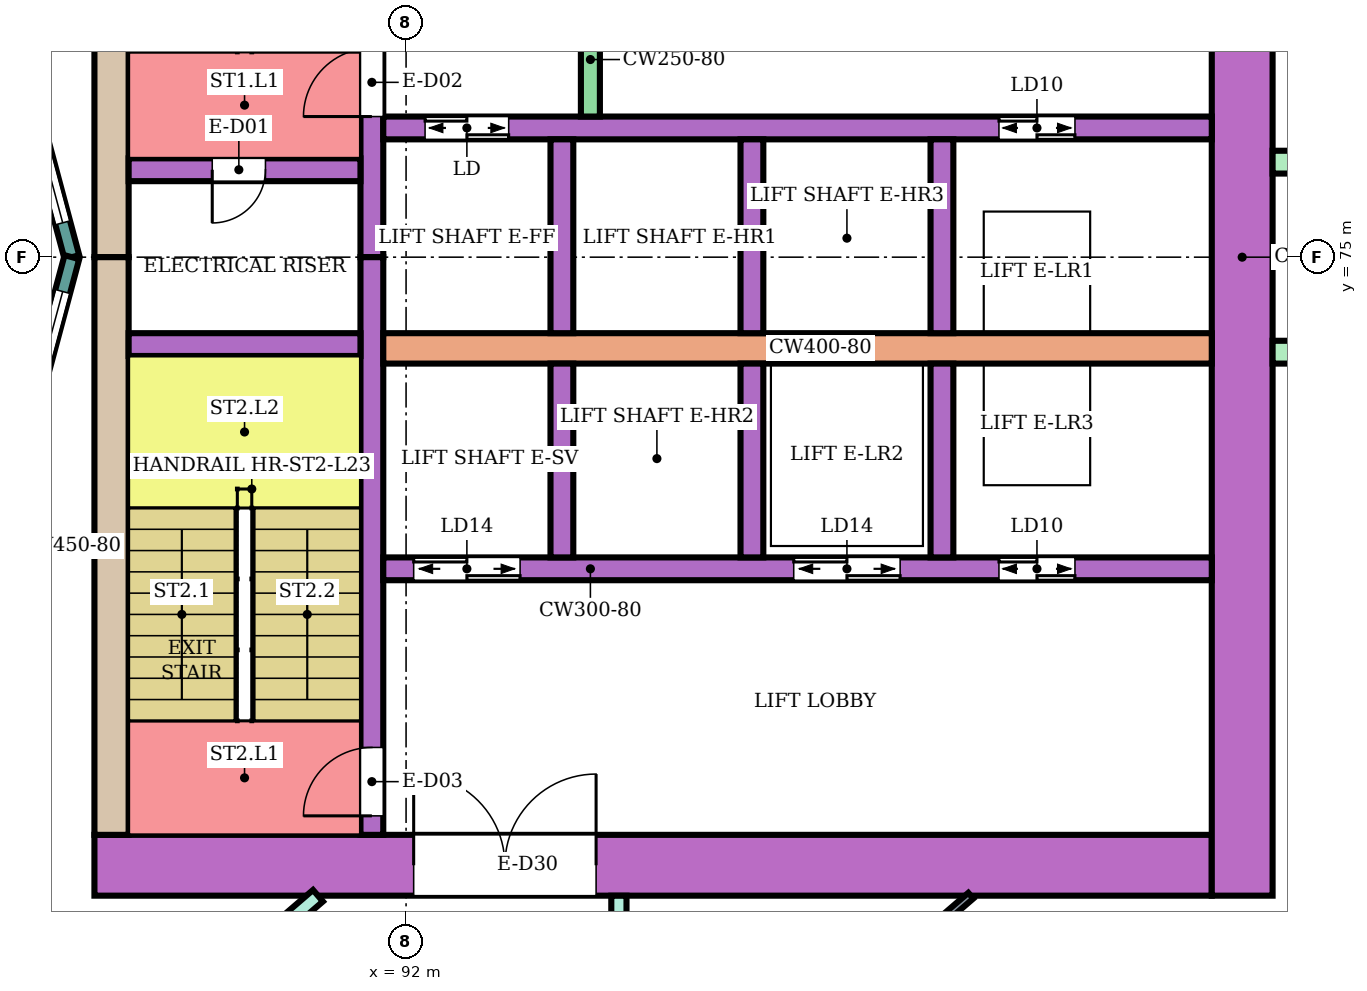
"""IFC4 building model, lengths in metres.
Left out: names, types, materials, properties, quantities, classifications, styles, units other than length and angle.
Written with IfcOpenShell. Run it as: python <this file> out.ifc"""

import sys

from ifc_helpers import new_model, si_unit, direction, frame, frame_2d, origin, place, context, subcontext, project, spatial, rectangle, extrude, element, fill, save


model = new_model("IFC4")
c1 = context("Model", 3, precision=1e-05, world=origin(), true_north=direction((0.0, 1.0)))
c2 = subcontext(c1, "Body", "Model", "MODEL_VIEW")
j1 = project(units=[si_unit("LENGTHUNIT", "METRE"), si_unit("PLANEANGLEUNIT", "RADIAN")], contexts=[c1])
p1 = place(None, origin())
s1 = spatial("IfcSite", under=j1, at=p1, CompositionType="ELEMENT")
p2 = place(p1, origin())
s2 = spatial("IfcBuilding", under=s1, at=p2, CompositionType="ELEMENT")
p3 = place(p2, frame((0.0, 0.0, 101.4)))
s3 = spatial("IfcBuildingStorey", under=s2, at=p3, CompositionType="ELEMENT", Elevation=101.4)
p4 = place(p3, frame((87.9, 67.0, 0.0), z_axis=(0.0, 0.0, 1.0), x_axis=(1.0, 0.0, 0.0)))
e1 = element("IfcWall", 1, at=p4, inside=s3, PredefinedType="SHEAR", context=c2, shape_type="SweptSolid", body=[
    extrude(rectangle(XDim=14.7, YDim=0.8, at=frame_2d((7.35, 0.0))), origin(), (0.0, 0.0, 1.0), 3.48),
])
p5 = place(p4, frame((4.2, 0.0, 0.0)))
e2 = element("IfcOpeningElement", 2, at=p5, cuts=e1, PredefinedType="OPENING", context=c2, shape_type="SweptSolid", body=[
    extrude(rectangle(XDim=2.4, YDim=2.4, at=frame_2d((1.2, 1.2))), frame((0.0, 0.41, 0.0), z_axis=(0.0, -1.0, 0.0), x_axis=(1.0, 0.0, 0.0)), (0.0, 0.0, 1.0), 0.82),
])
for number, where, z_axis, x_axis in (
    (3, (88.125, 75.0, 0.0), (0.0, 0.0, 1.0), (0.0, 1.0, 0.0)),
    (4, (88.125, 67.4, 0.0), (0.0, 0.0, 1.0), (0.0, 1.0, 0.0)),
):
    element("IfcWall", number, at=place(p3, frame(where, z_axis=z_axis, x_axis=x_axis)), inside=s3, PredefinedType="SHEAR", context=c2, shape_type="SweptSolid", body=[
        extrude(rectangle(XDim=7.6, YDim=0.45, at=frame_2d((3.8, 0.0))), origin(), (0.0, 0.0, 1.0), 3.48),
    ])
p6 = place(p3, frame((103.0, 66.6, 0.0), z_axis=(0.0, 0.0, 1.0), x_axis=(0.0, 1.0, 0.0)))
e5 = element("IfcWall", 5, at=p6, inside=s3, PredefinedType="SHEAR", context=c2, shape_type="SweptSolid", body=[
    extrude(rectangle(XDim=16.8, YDim=0.8, at=frame_2d((8.4, 0.0))), origin(), (0.0, 0.0, 1.0), 3.48),
])
p7 = place(p3, frame((91.55, 75.0, 0.0), z_axis=(0.0, 0.0, 1.0), x_axis=(0.0, 1.0, 0.0)))
e6 = element("IfcWall", 6, at=p7, inside=s3, PredefinedType="SHEAR", context=c2, shape_type="SweptSolid", body=[
    extrude(rectangle(XDim=7.6, YDim=0.3, at=frame_2d((3.8, 0.0))), origin(), (0.0, 0.0, 1.0), 3.48),
])
p8 = place(p7, frame((1.85, 0.0, 0.0)))
e7 = element("IfcOpeningElement", 7, at=p8, cuts=e6, PredefinedType="OPENING", context=c2, shape_type="SweptSolid", body=[
    extrude(rectangle(XDim=0.9, YDim=2.1, at=frame_2d((0.45, 1.05))), frame((0.0, 0.16, 0.0), z_axis=(0.0, -1.0, 0.0), x_axis=(1.0, 0.0, 0.0)), (0.0, 0.0, 1.0), 0.32),
])
p9 = place(p3, frame((91.55, 67.4, 0.0), z_axis=(0.0, 0.0, 1.0), x_axis=(0.0, 1.0, 0.0)))
e8 = element("IfcWall", 8, at=p9, inside=s3, PredefinedType="SHEAR", context=c2, shape_type="SweptSolid", body=[
    extrude(rectangle(XDim=7.6, YDim=0.3, at=frame_2d((3.8, 0.0))), origin(), (0.0, 0.0, 1.0), 3.48),
])
p10 = place(p9, frame((0.25, 0.0, 0.0)))
e9 = element("IfcOpeningElement", 9, at=p10, cuts=e8, PredefinedType="OPENING", context=c2, shape_type="SweptSolid", body=[
    extrude(rectangle(XDim=0.9, YDim=2.1, at=frame_2d((0.45, 1.05))), frame((0.0, 0.16, 0.0), z_axis=(0.0, -1.0, 0.0), x_axis=(1.0, 0.0, 0.0)), (0.0, 0.0, 1.0), 0.32),
])
p11 = place(p3, frame((88.35, 76.15, 0.0), z_axis=(0.0, 0.0, 1.0), x_axis=(1.0, 0.0, 0.0)))
e10 = element("IfcWall", 10, at=p11, inside=s3, PredefinedType="SHEAR", context=c2, shape_type="SweptSolid", body=[
    extrude(rectangle(XDim=3.05, YDim=0.3, at=frame_2d((1.525, 0.0))), origin(), (0.0, 0.0, 1.0), 3.48),
])
p12 = place(p11, frame((1.1, 0.0, 0.0)))
e11 = element("IfcOpeningElement", 11, at=p12, cuts=e10, PredefinedType="OPENING", context=c2, shape_type="SweptSolid", body=[
    extrude(rectangle(XDim=0.7, YDim=2.0, at=frame_2d((0.35, 1.0))), frame((0.0, 0.16, 0.0), z_axis=(0.0, -1.0, 0.0), x_axis=(1.0, 0.0, 0.0)), (0.0, 0.0, 1.0), 0.32),
])
p13 = place(p3, frame((88.35, 73.85, 0.0), z_axis=(0.0, 0.0, 1.0), x_axis=(1.0, 0.0, 0.0)))
e12 = element("IfcWall", 12, at=p13, inside=s3, PredefinedType="SHEAR", context=c2, shape_type="SweptSolid", body=[
    extrude(rectangle(XDim=3.05, YDim=0.3, at=frame_2d((1.525, 0.0))), origin(), (0.0, 0.0, 1.0), 3.48),
])
p14 = place(p3, frame((91.7, 76.7, 0.0), z_axis=(0.0, 0.0, 1.0), x_axis=(1.0, 0.0, 0.0)))
e13 = element("IfcWall", 13, at=p14, inside=s3, PredefinedType="SHEAR", context=c2, shape_type="SweptSolid", body=[
    extrude(rectangle(XDim=10.9, YDim=0.3, at=frame_2d((5.45, 0.0))), origin(), (0.0, 0.0, 1.0), 3.48),
])
p15 = place(p14, frame((0.55, 0.0, 0.0)))
e14 = element("IfcOpeningElement", 14, at=p15, cuts=e13, PredefinedType="OPENING", context=c2, shape_type="SweptSolid", body=[
    extrude(rectangle(XDim=1.1, YDim=2.1, at=frame_2d((0.55, 1.05))), frame((0.0, 0.16, 0.0), z_axis=(0.0, -1.0, 0.0), x_axis=(1.0, 0.0, 0.0)), (0.0, 0.0, 1.0), 0.32),
])
p16 = place(p14, frame((8.1, 0.0, 0.0)))
e15 = element("IfcOpeningElement", 15, at=p16, cuts=e13, PredefinedType="OPENING", context=c2, shape_type="SweptSolid", body=[
    extrude(rectangle(XDim=1.0, YDim=2.1, at=frame_2d((0.5, 1.05))), frame((0.0, 0.16, 0.0), z_axis=(0.0, -1.0, 0.0), x_axis=(1.0, 0.0, 0.0)), (0.0, 0.0, 1.0), 0.32),
])
p17 = place(p3, frame((91.7, 73.8, 0.0), z_axis=(0.0, 0.0, 1.0), x_axis=(1.0, 0.0, 0.0)))
e16 = element("IfcWall", 16, at=p17, inside=s3, PredefinedType="SHEAR", context=c2, shape_type="SweptSolid", body=[
    extrude(rectangle(XDim=10.9, YDim=0.4, at=frame_2d((5.45, 0.0))), origin(), (0.0, 0.0, 1.0), 3.48),
])
p18 = place(p3, frame((91.7, 70.9, 0.0), z_axis=(0.0, 0.0, 1.0), x_axis=(1.0, 0.0, 0.0)))
e17 = element("IfcWall", 17, at=p18, inside=s3, PredefinedType="SHEAR", context=c2, shape_type="SweptSolid", body=[
    extrude(rectangle(XDim=10.9, YDim=0.3, at=frame_2d((5.45, 0.0))), origin(), (0.0, 0.0, 1.0), 3.48),
])
p19 = place(p18, frame((0.4, 0.0, 0.0)))
e18 = element("IfcOpeningElement", 18, at=p19, cuts=e17, PredefinedType="OPENING", context=c2, shape_type="SweptSolid", body=[
    extrude(rectangle(XDim=1.4, YDim=2.1, at=frame_2d((0.7, 1.05))), frame((0.0, 0.16, 0.0), z_axis=(0.0, -1.0, 0.0), x_axis=(1.0, 0.0, 0.0)), (0.0, 0.0, 1.0), 0.32),
])
p20 = place(p18, frame((5.4, 0.0, 0.0)))
e19 = element("IfcOpeningElement", 19, at=p20, cuts=e17, PredefinedType="OPENING", context=c2, shape_type="SweptSolid", body=[
    extrude(rectangle(XDim=1.4, YDim=2.1, at=frame_2d((0.7, 1.05))), frame((0.0, 0.16, 0.0), z_axis=(0.0, -1.0, 0.0), x_axis=(1.0, 0.0, 0.0)), (0.0, 0.0, 1.0), 0.32),
])
p21 = place(p18, frame((8.1, 0.0, 0.0)))
e20 = element("IfcOpeningElement", 20, at=p21, cuts=e17, PredefinedType="OPENING", context=c2, shape_type="SweptSolid", body=[
    extrude(rectangle(XDim=1.0, YDim=2.1, at=frame_2d((0.5, 1.05))), frame((0.0, 0.16, 0.0), z_axis=(0.0, -1.0, 0.0), x_axis=(1.0, 0.0, 0.0)), (0.0, 0.0, 1.0), 0.32),
])
for number, where, z_axis, x_axis in (
    (21, (94.05, 74.0, 0.0), (0.0, 0.0, 1.0), (0.0, 1.0, 0.0)),
    (22, (96.55, 74.0, 0.0), (0.0, 0.0, 1.0), (0.0, 1.0, 0.0)),
    (23, (99.05, 74.0, 0.0), (0.0, 0.0, 1.0), (0.0, 1.0, 0.0)),
    (24, (94.05, 71.05, 0.0), (0.0, 0.0, 1.0), (0.0, 1.0, 0.0)),
    (25, (96.55, 71.05, 0.0), (0.0, 0.0, 1.0), (0.0, 1.0, 0.0)),
    (26, (99.05, 71.05, 0.0), (0.0, 0.0, 1.0), (0.0, 1.0, 0.0)),
):
    element("IfcWall", number, at=place(p3, frame(where, z_axis=z_axis, x_axis=x_axis)), inside=s3, PredefinedType="SHEAR", context=c2, shape_type="SweptSolid", body=[
        extrude(rectangle(XDim=2.55, YDim=0.3, at=frame_2d((1.275, 0.0))), origin(), (0.0, 0.0, 1.0), 3.48),
    ])
p22 = place(p3, frame((94.425, 76.85, 0.0), z_axis=(0.0, 0.0, 1.0), x_axis=(0.0, 1.0, 0.0)))
e27 = element("IfcWall", 27, at=p22, inside=s3, PredefinedType="SHEAR", context=c2, shape_type="SweptSolid", body=[
    extrude(rectangle(XDim=1.5, YDim=0.25, at=frame_2d((0.75, 0.0))), origin(), (0.0, 0.0, 1.0), 3.48),
])
for number, where, z_axis, x_axis in (
    (28, (103.4, 73.75, 0.0), (0.0, 0.0, 1.0), (1.0, 0.0, 0.0)),
    (29, (103.4, 76.25, 0.0), (0.0, 0.0, 1.0), (1.0, 0.0, 0.0)),
):
    element("IfcWall", number, at=place(p3, frame(where, z_axis=z_axis, x_axis=x_axis)), inside=s3, PredefinedType="NOTDEFINED", context=c2, shape_type="SweptSolid", body=[
        extrude(rectangle(XDim=2.416, YDim=0.3, at=frame_2d((1.208, 0.0))), origin(), (0.0, 0.0, 1.0), 3.8),
    ])
p23 = place(p3, frame((87.604, 75.0, 0.0), z_axis=(0.0, 0.0, 1.0), x_axis=(-0.258789828301, 0.965933654434, 0.0)))
e30 = element("IfcWall", 30, at=p23, inside=s3, PredefinedType="NOTDEFINED", context=c2, shape_type="SweptSolid", body=[
    extrude(rectangle(XDim=3.936, YDim=0.2, at=frame_2d((1.968, 0.0))), origin(), (0.0, 0.0, 1.0), 3.8),
])
p24 = place(p23, frame((0.468, 0.0, 0.9)))
e31 = element("IfcOpeningElement", 31, at=p24, cuts=e30, PredefinedType="OPENING", context=c2, shape_type="SweptSolid", body=[
    extrude(rectangle(XDim=3.0, YDim=2.3, at=frame_2d((1.5, 1.15))), frame((0.0, 0.11, 0.0), z_axis=(0.0, -1.0, 0.0), x_axis=(1.0, 0.0, 0.0)), (0.0, 0.0, 1.0), 0.22),
])
p25 = place(p3, frame((86.585, 71.198, 0.0), z_axis=(0.0, 0.0, 1.0), x_axis=(0.258789828301, 0.965933654434, 0.0)))
e32 = element("IfcWall", 32, at=p25, inside=s3, PredefinedType="NOTDEFINED", context=c2, shape_type="SweptSolid", body=[
    extrude(rectangle(XDim=3.936, YDim=0.2, at=frame_2d((1.968, 0.0))), origin(), (0.0, 0.0, 1.0), 3.8),
])
p26 = place(p25, frame((0.468, 0.0, 0.9)))
e33 = element("IfcOpeningElement", 33, at=p26, cuts=e32, PredefinedType="OPENING", context=c2, shape_type="SweptSolid", body=[
    extrude(rectangle(XDim=3.0, YDim=2.3, at=frame_2d((1.5, 1.15))), frame((0.0, 0.11, 0.0), z_axis=(0.0, -1.0, 0.0), x_axis=(1.0, 0.0, 0.0)), (0.0, 0.0, 1.0), 0.22),
])
p27 = place(p3, frame((86.877, 63.189, 0.0), z_axis=(0.0, 0.0, 1.0), x_axis=(0.758088707506, 0.652151448325, 0.0)))
e34 = element("IfcWall", 34, at=p27, inside=s3, PredefinedType="PARTITIONING", context=c2, shape_type="SweptSolid", body=[
    extrude(rectangle(XDim=5.229, YDim=0.2, at=frame_2d((2.615, 0.0))), origin(), (0.0, 0.0, 1.0), 3.35),
])
p28 = place(p3, frame((94.8, 65.1, 0.0), z_axis=(0.0, 0.0, 1.0), x_axis=(0.0, 1.0, 0.0)))
e35 = element("IfcWall", 35, at=p28, inside=s3, PredefinedType="PARTITIONING", context=c2, shape_type="SweptSolid", body=[
    extrude(rectangle(XDim=1.499, YDim=0.2, at=frame_2d((0.75, 0.0))), origin(), (0.0, 0.0, 1.0), 3.35),
])
p29 = place(p3, frame((93.577, 61.565, 0.0), z_axis=(0.0, 0.0, 1.0), x_axis=(0.75812140399, 0.652113438607, 0.0)))
e36 = element("IfcWall", 36, at=p29, inside=s3, PredefinedType="PARTITIONING", context=c2, shape_type="SweptSolid", body=[
    extrude(rectangle(XDim=7.72, YDim=0.1, at=frame_2d((3.86, 0.0))), origin(), (0.0, 0.0, 1.0), 3.35),
])
p30 = place(p29, frame((4.35, 0.0, 0.0)))
e37 = element("IfcOpeningElement", 37, at=p30, cuts=e36, PredefinedType="OPENING", context=c2, shape_type="SweptSolid", body=[
    extrude(rectangle(XDim=0.9, YDim=2.1, at=frame_2d((0.45, 1.05))), frame((0.0, 0.06, 0.0), z_axis=(0.0, -1.0, 0.0), x_axis=(1.0, 0.0, 0.0)), (0.0, 0.0, 1.0), 0.12),
])
p31 = place(p24, origin())
e38 = element("IfcWindow", 38, at=p31, inside=s3, PartitioningType="SINGLE_PANEL", PredefinedType="WINDOW", context=c2, shape_type="SweptSolid", body=[
    extrude(rectangle(XDim=3.0, YDim=2.3, at=frame_2d((1.5, 1.15))), frame((0.0, 0.03, 0.0), z_axis=(0.0, -1.0, 0.0), x_axis=(1.0, 0.0, 0.0)), (0.0, 0.0, 1.0), 0.06),
])
fill(e31, e38)
p32 = place(p26, origin())
e39 = element("IfcWindow", 39, at=p32, inside=s3, PartitioningType="SINGLE_PANEL", PredefinedType="WINDOW", context=c2, shape_type="SweptSolid", body=[
    extrude(rectangle(XDim=3.0, YDim=2.3, at=frame_2d((1.5, 1.15))), frame((0.0, 0.03, 0.0), z_axis=(0.0, -1.0, 0.0), x_axis=(1.0, 0.0, 0.0)), (0.0, 0.0, 1.0), 0.06),
])
fill(e33, e39)
p33 = place(p12, frame((0.7, 0.0, 0.0), z_axis=(0.0, 0.0, 1.0), x_axis=(-1.0, 0.0, 0.0)))
e40 = element("IfcDoor", 40, at=p33, inside=s3, OperationType="SINGLE_SWING_RIGHT", PredefinedType="DOOR", context=c2, shape_type="SweptSolid", body=[
    extrude(rectangle(XDim=0.7, YDim=2.0, at=frame_2d((0.35, 1.0))), frame((0.0, 0.025, 0.0), z_axis=(0.0, -1.0, 0.0), x_axis=(1.0, 0.0, 0.0)), (0.0, 0.0, 1.0), 0.05),
])
fill(e11, e40)
p34 = place(p8, origin())
e41 = element("IfcDoor", 41, at=p34, inside=s3, OperationType="SINGLE_SWING_LEFT", PredefinedType="DOOR", context=c2, shape_type="SweptSolid", body=[
    extrude(rectangle(XDim=0.9, YDim=2.1, at=frame_2d((0.45, 1.05))), frame((0.0, 0.025, 0.0), z_axis=(0.0, -1.0, 0.0), x_axis=(1.0, 0.0, 0.0)), (0.0, 0.0, 1.0), 0.05),
])
fill(e7, e41)
p35 = place(p10, origin())
e42 = element("IfcDoor", 42, at=p35, inside=s3, OperationType="SINGLE_SWING_LEFT", PredefinedType="DOOR", context=c2, shape_type="SweptSolid", body=[
    extrude(rectangle(XDim=0.9, YDim=2.1, at=frame_2d((0.45, 1.05))), frame((0.0, 0.025, 0.0), z_axis=(0.0, -1.0, 0.0), x_axis=(1.0, 0.0, 0.0)), (0.0, 0.0, 1.0), 0.05),
])
fill(e9, e42)
p36 = place(p15, origin())
e43 = element("IfcDoor", 43, at=p36, inside=s3, OperationType="DOUBLE_DOOR_SLIDING", PredefinedType="DOOR", context=c2, shape_type="SweptSolid", body=[
    extrude(rectangle(XDim=1.1, YDim=2.1, at=frame_2d((0.55, 1.05))), frame((0.0, 0.025, 0.0), z_axis=(0.0, -1.0, 0.0), x_axis=(1.0, 0.0, 0.0)), (0.0, 0.0, 1.0), 0.05),
])
fill(e14, e43)
p37 = place(p16, origin())
e44 = element("IfcDoor", 44, at=p37, inside=s3, OperationType="DOUBLE_DOOR_SLIDING", PredefinedType="DOOR", context=c2, shape_type="SweptSolid", body=[
    extrude(rectangle(XDim=1.0, YDim=2.1, at=frame_2d((0.5, 1.05))), frame((0.0, 0.025, 0.0), z_axis=(0.0, -1.0, 0.0), x_axis=(1.0, 0.0, 0.0)), (0.0, 0.0, 1.0), 0.05),
])
fill(e15, e44)
p38 = place(p19, origin())
e45 = element("IfcDoor", 45, at=p38, inside=s3, OperationType="DOUBLE_DOOR_SLIDING", PredefinedType="DOOR", context=c2, shape_type="SweptSolid", body=[
    extrude(rectangle(XDim=1.4, YDim=2.1, at=frame_2d((0.7, 1.05))), frame((0.0, 0.025, 0.0), z_axis=(0.0, -1.0, 0.0), x_axis=(1.0, 0.0, 0.0)), (0.0, 0.0, 1.0), 0.05),
])
fill(e18, e45)
p39 = place(p20, origin())
e46 = element("IfcDoor", 46, at=p39, inside=s3, OperationType="DOUBLE_DOOR_SLIDING", PredefinedType="DOOR", context=c2, shape_type="SweptSolid", body=[
    extrude(rectangle(XDim=1.4, YDim=2.1, at=frame_2d((0.7, 1.05))), frame((0.0, 0.025, 0.0), z_axis=(0.0, -1.0, 0.0), x_axis=(1.0, 0.0, 0.0)), (0.0, 0.0, 1.0), 0.05),
])
fill(e19, e46)
p40 = place(p21, origin())
e47 = element("IfcDoor", 47, at=p40, inside=s3, OperationType="DOUBLE_DOOR_SLIDING", PredefinedType="DOOR", context=c2, shape_type="SweptSolid", body=[
    extrude(rectangle(XDim=1.0, YDim=2.1, at=frame_2d((0.5, 1.05))), frame((0.0, 0.025, 0.0), z_axis=(0.0, -1.0, 0.0), x_axis=(1.0, 0.0, 0.0)), (0.0, 0.0, 1.0), 0.05),
])
fill(e20, e47)
p41 = place(p5, origin())
e48 = element("IfcDoor", 48, at=p41, inside=s3, OperationType="DOUBLE_DOOR_SINGLE_SWING", PredefinedType="DOOR", context=c2, shape_type="SweptSolid", body=[
    extrude(rectangle(XDim=2.4, YDim=2.4, at=frame_2d((1.2, 1.2))), frame((0.0, 0.025, 0.0), z_axis=(0.0, -1.0, 0.0), x_axis=(1.0, 0.0, 0.0)), (0.0, 0.0, 1.0), 0.05),
])
fill(e2, e48)
save(model, sys.argv[1])
